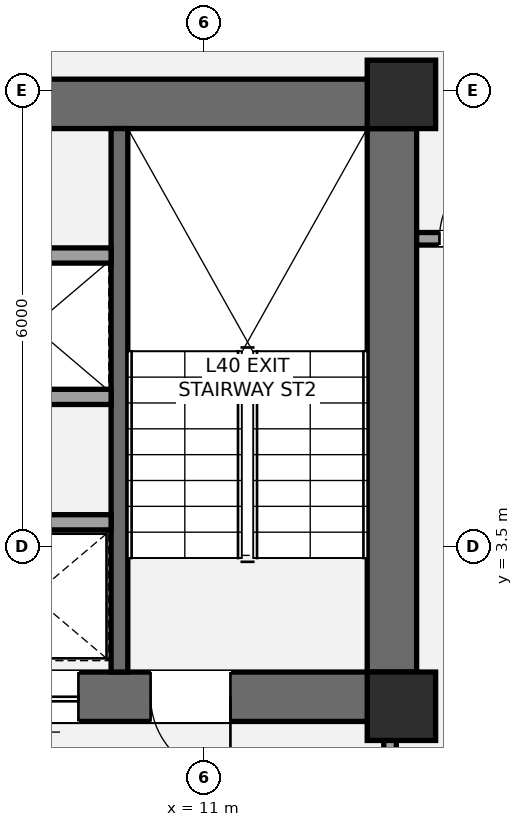
"""IFC4 building model, lengths in metres.
Left out: names, types, materials, properties, quantities, classifications, styles, units other than length and angle.
Written with IfcOpenShell. Run it as: python <this file> out.ifc"""

import sys

from ifc_helpers import new_model, si_unit, direction, frame, frame_2d, origin, origin_2d, place, context, subcontext, project, spatial, rectangle, extrude, element, fill, save


model = new_model("IFC4")
c1 = context("Model", 3, precision=1e-05, world=origin(), true_north=direction((0.0, 1.0)))
c2 = subcontext(c1, "Body", "Model", "MODEL_VIEW")
j1 = project(units=[si_unit("LENGTHUNIT", "METRE"), si_unit("PLANEANGLEUNIT", "RADIAN")], contexts=[c1])
p1 = place(None, origin())
s1 = spatial("IfcSite", under=j1, at=p1, CompositionType="ELEMENT")
p2 = place(p1, origin())
s2 = spatial("IfcBuilding", under=s1, at=p2, CompositionType="ELEMENT")
p3 = place(p2, frame((0.0, 0.0, 150.2)))
s3 = spatial("IfcBuildingStorey", under=s2, at=p3, CompositionType="ELEMENT", Elevation=150.2)
p4 = place(p3, frame((13.475, 1.2, 0.0), z_axis=(0.0, 0.0, 1.0), x_axis=(0.0, 1.0, 0.0)))
e1 = element("IfcWall", 1, at=p4, inside=s3, PredefinedType="SHEAR", context=c2, shape_type="SweptSolid", body=[
    extrude(rectangle(XDim=8.45, YDim=0.65, at=frame_2d((4.225, 0.0))), origin(), (0.0, 0.0, 1.0), 3.2),
])
p5 = place(p3, frame((4.475, 9.325, 0.0), z_axis=(0.0, 0.0, 1.0), x_axis=(1.0, 0.0, 0.0)))
e2 = element("IfcWall", 2, at=p5, inside=s3, PredefinedType="SHEAR", context=c2, shape_type="SweptSolid", body=[
    extrude(rectangle(XDim=9.325, YDim=0.65, at=frame_2d((4.663, 0.0))), origin(), (0.0, 0.0, 1.0), 3.2),
])
p6 = place(p3, frame((13.8, 1.525, 0.0), z_axis=(0.0, 0.0, 1.0), x_axis=(-1.0, 0.0, 0.0)))
e3 = element("IfcWall", 3, at=p6, inside=s3, PredefinedType="SHEAR", context=c2, shape_type="SweptSolid", body=[
    extrude(rectangle(XDim=8.925, YDim=0.65, at=frame_2d((4.462, 0.0))), origin(), (0.0, 0.0, 1.0), 3.2),
])
p7 = place(p6, frame((2.45, 0.0, 0.0)))
e4 = element("IfcOpeningElement", 4, at=p7, cuts=e3, PredefinedType="OPENING", context=c2, shape_type="SweptSolid", body=[
    extrude(rectangle(XDim=1.05, YDim=2.15, at=frame_2d((0.525, 1.075))), frame((0.0, 0.335, 0.0), z_axis=(0.0, -1.0, 0.0), x_axis=(1.0, 0.0, 0.0)), (0.0, 0.0, 1.0), 0.67),
])
p8 = place(p6, frame((4.45, 0.0, 0.0)))
e5 = element("IfcOpeningElement", 5, at=p8, cuts=e3, PredefinedType="OPENING", context=c2, shape_type="SweptSolid", body=[
    extrude(rectangle(XDim=1.1, YDim=2.2, at=frame_2d((0.55, 1.1))), frame((0.0, 0.335, 0.0), z_axis=(0.0, -1.0, 0.0), x_axis=(1.0, 0.0, 0.0)), (0.0, 0.0, 1.0), 0.67),
])
p9 = place(p3, frame((9.89, 1.85, 0.0), z_axis=(0.0, 0.0, 1.0), x_axis=(0.0, 1.0, 0.0)))
e6 = element("IfcWall", 6, at=p9, inside=s3, PredefinedType="SHEAR", context=c2, shape_type="SweptSolid", body=[
    extrude(rectangle(XDim=7.15, YDim=0.22, at=frame_2d((3.575, 0.0))), origin(), (0.0, 0.0, 1.0), 3.2),
])
for number, where, z_axis, x_axis in (
    (7, (13.6, 1.4, 0.0), (0.0, 0.0, 1.0), (1.0, 0.0, 0.0)),
    (8, (13.6, 9.45, 0.0), (0.0, 0.0, 1.0), (1.0, 0.0, 0.0)),
):
    element("IfcColumn", number, at=place(p3, frame(where, z_axis=z_axis, x_axis=x_axis)), inside=s3, PredefinedType="COLUMN", context=c2, shape_type="SweptSolid", body=[
        extrude(rectangle(XDim=0.9, YDim=0.9, at=origin_2d()), origin(), (0.0, 0.0, 1.0), 3.2),
    ])
p10 = place(p3, frame((13.45, -2.15, 0.0), z_axis=(0.0, 0.0, 1.0), x_axis=(0.0, 1.0, 0.0)))
e9 = element("IfcWall", 9, at=p10, inside=s3, PredefinedType="PARTITIONING", context=c2, shape_type="SweptSolid", body=[
    extrude(rectangle(XDim=3.4, YDim=0.165, at=frame_2d((1.7, 0.0))), origin(), (0.0, 0.0, 1.0), 2.473),
])
p11 = place(p10, frame((1.15, 0.0, 0.0)))
e10 = element("IfcOpeningElement", 10, at=p11, cuts=e9, PredefinedType="OPENING", context=c2, shape_type="SweptSolid", body=[
    extrude(rectangle(XDim=1.05, YDim=2.15, at=frame_2d((0.525, 1.075))), frame((0.0, 0.093, 0.0), z_axis=(0.0, -1.0, 0.0), x_axis=(1.0, 0.0, 0.0)), (0.0, 0.0, 1.0), 0.185),
])
p12 = place(p3, frame((5.525, 3.82, 0.0), z_axis=(0.0, 0.0, 1.0), x_axis=(1.0, 0.0, 0.0)))
e11 = element("IfcWall", 11, at=p12, inside=s3, PredefinedType="SOLIDWALL", context=c2, shape_type="SweptSolid", body=[
    extrude(rectangle(XDim=4.255, YDim=0.2, at=frame_2d((2.127, 0.0))), origin(), (0.0, 0.0, 1.0), 3.02),
])
p13 = place(p12, frame((0.65, 0.0, 0.0)))
e12 = element("IfcOpeningElement", 12, at=p13, cuts=e11, PredefinedType="OPENING", context=c2, shape_type="SweptSolid", body=[
    extrude(rectangle(XDim=1.2, YDim=2.2, at=frame_2d((0.6, 1.1))), frame((0.0, 0.11, 0.0), z_axis=(0.0, -1.0, 0.0), x_axis=(1.0, 0.0, 0.0)), (0.0, 0.0, 1.0), 0.22),
])
for number, where, z_axis, x_axis in (
    (13, (5.525, 5.47, 0.0), (0.0, 0.0, 1.0), (1.0, 0.0, 0.0)),
    (14, (5.525, 7.33, 0.0), (0.0, 0.0, 1.0), (1.0, 0.0, 0.0)),
):
    element("IfcWall", number, at=place(p3, frame(where, z_axis=z_axis, x_axis=x_axis)), inside=s3, PredefinedType="SOLIDWALL", context=c2, shape_type="SweptSolid", body=[
        extrude(rectangle(XDim=4.255, YDim=0.2, at=frame_2d((2.127, 0.0))), origin(), (0.0, 0.0, 1.0), 3.02),
    ])
p14 = place(p3, frame((13.8, 7.55, 0.0), z_axis=(0.0, 0.0, 1.0), x_axis=(1.0, 0.0, 0.0)))
e15 = element("IfcWall", 15, at=p14, inside=s3, PredefinedType="PARTITIONING", context=c2, shape_type="SweptSolid", body=[
    extrude(rectangle(XDim=1.75, YDim=0.165, at=frame_2d((0.875, 0.0))), origin(), (0.0, 0.0, 1.0), 3.02),
])
p15 = place(p14, frame((0.3, 0.0, 0.0)))
e16 = element("IfcOpeningElement", 16, at=p15, cuts=e15, PredefinedType="OPENING", context=c2, shape_type="SweptSolid", body=[
    extrude(rectangle(XDim=1.0, YDim=2.15, at=frame_2d((0.5, 1.075))), frame((0.0, 0.093, 0.0), z_axis=(0.0, -1.0, 0.0), x_axis=(1.0, 0.0, 0.0)), (0.0, 0.0, 1.0), 0.185),
])
p16 = place(p7, origin())
e17 = element("IfcDoor", 17, at=p16, inside=s3, OperationType="SINGLE_SWING_LEFT", PredefinedType="DOOR", context=c2, shape_type="SweptSolid", body=[
    extrude(rectangle(XDim=1.05, YDim=2.15, at=frame_2d((0.525, 1.075))), frame((0.0, 0.025, 0.0), z_axis=(0.0, -1.0, 0.0), x_axis=(1.0, 0.0, 0.0)), (0.0, 0.0, 1.0), 0.05),
])
fill(e4, e17)
p17 = place(p8, origin())
e18 = element("IfcDoor", 18, at=p17, inside=s3, OperationType="SLIDING_TO_LEFT", PredefinedType="DOOR", context=c2, shape_type="SweptSolid", body=[
    extrude(rectangle(XDim=1.1, YDim=2.2, at=frame_2d((0.55, 1.1))), frame((0.0, 0.025, 0.0), z_axis=(0.0, -1.0, 0.0), x_axis=(1.0, 0.0, 0.0)), (0.0, 0.0, 1.0), 0.05),
])
fill(e5, e18)
p18 = place(p15, origin())
e19 = element("IfcDoor", 19, at=p18, inside=s3, OperationType="SINGLE_SWING_RIGHT", PredefinedType="DOOR", context=c2, shape_type="SweptSolid", body=[
    extrude(rectangle(XDim=1.0, YDim=2.15, at=frame_2d((0.5, 1.075))), frame((0.0, 0.025, 0.0), z_axis=(0.0, -1.0, 0.0), x_axis=(1.0, 0.0, 0.0)), (0.0, 0.0, 1.0), 0.05),
])
fill(e16, e19)
save(model, sys.argv[1])
